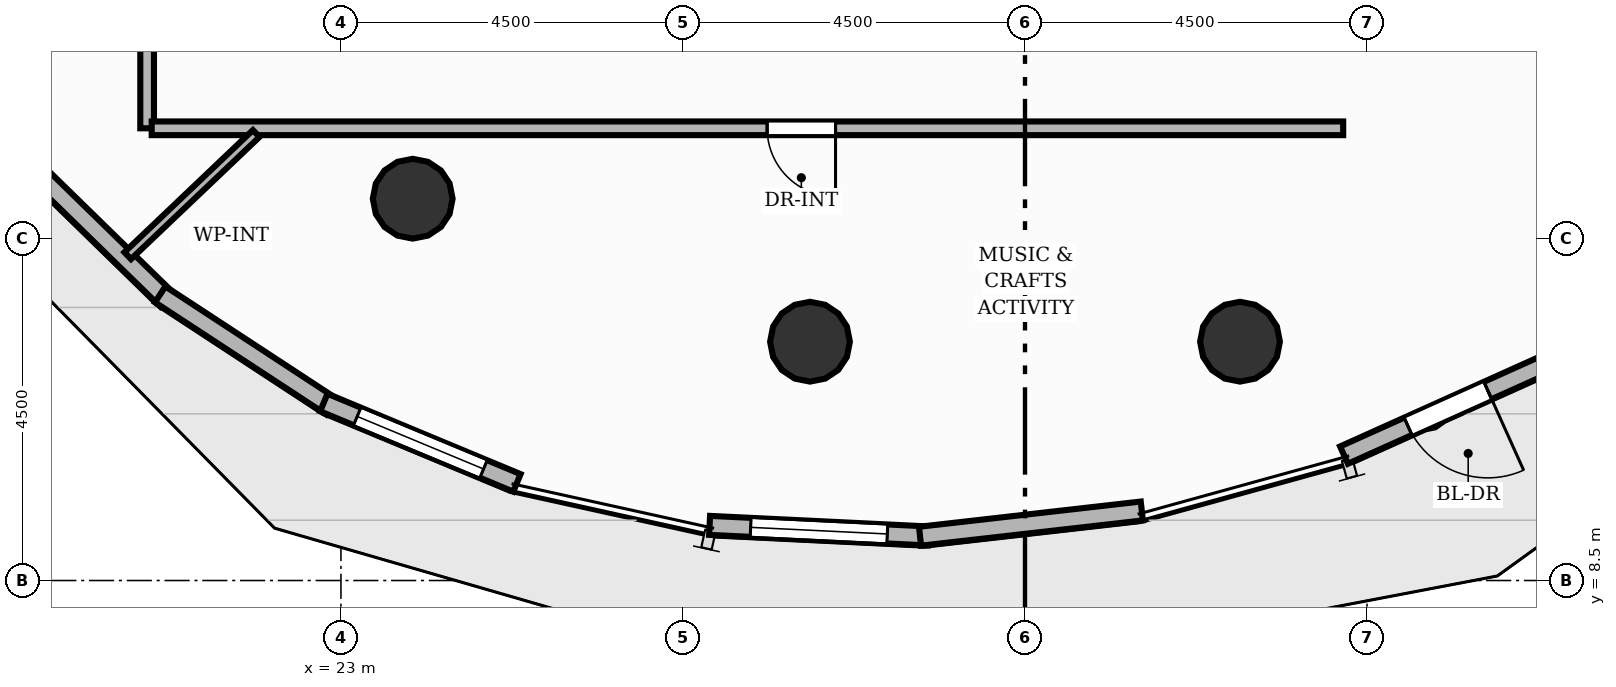
"""IFC4 building model, lengths in metres.
Left out: names, types, materials, properties, quantities, classifications, styles, units other than length and angle.
Written with IfcOpenShell. Run it as: python <this file> out.ifc"""

import sys

from ifc_helpers import new_model, si_unit, direction, frame, frame_2d, origin, origin_2d, place, context, subcontext, project, spatial, rectangle, circle, extrude, element, fill, save


model = new_model("IFC4")
c1 = context("Model", 3, precision=1e-05, world=origin(), true_north=direction((0.0, 1.0)))
c2 = subcontext(c1, "Body", "Model", "MODEL_VIEW")
j1 = project(units=[si_unit("LENGTHUNIT", "METRE"), si_unit("PLANEANGLEUNIT", "RADIAN")], contexts=[c1])
p1 = place(None, origin())
s1 = spatial("IfcSite", under=j1, at=p1, CompositionType="ELEMENT")
p2 = place(p1, origin())
s2 = spatial("IfcBuilding", under=s1, at=p2, CompositionType="ELEMENT")
p3 = place(p2, frame((0.0, 0.0, 116.96)))
s3 = spatial("IfcBuildingStorey", under=s2, at=p3, CompositionType="ELEMENT", Elevation=116.96)
for number, where, z_axis, x_axis in (
    (1, (23.944, 13.523, 0.0), (0.0, 0.0, 1.0), (1.0, 0.0, 0.0)),
    (2, (29.171, 11.642, 0.0), (0.0, 0.0, 1.0), (1.0, 0.0, 0.0)),
    (3, (34.829, 11.642, 0.0), (0.0, 0.0, 1.0), (1.0, 0.0, 0.0)),
):
    element("IfcColumn", number, at=place(p3, frame(where, z_axis=z_axis, x_axis=x_axis)), inside=s3, PredefinedType="COLUMN", context=c2, shape_type="SweptSolid", body=[
        extrude(circle(Radius=0.525, at=origin_2d()), origin(), (0.0, 0.0, 1.0), 3.2),
    ])
p4 = place(p3, frame((20.71, 12.194, 0.0), z_axis=(0.0, 0.0, 1.0), x_axis=(-0.715536902875, 0.698574935582, 0.0)))
e4 = element("IfcWall", 4, at=p4, inside=s3, PredefinedType="SOLIDWALL", context=c2, shape_type="SweptSolid", body=[
    extrude(rectangle(XDim=2.648, YDim=0.25, at=frame_2d((1.324, 0.0))), origin(), (0.0, 0.0, 1.0), 2.96),
])
p5 = place(p3, frame((22.874, 10.789, 0.0), z_axis=(0.0, 0.0, 1.0), x_axis=(-0.836445365251, 0.5480503179, 0.0)))
e5 = element("IfcWall", 5, at=p5, inside=s3, PredefinedType="SOLIDWALL", context=c2, shape_type="SweptSolid", body=[
    extrude(rectangle(XDim=2.693, YDim=0.25, at=frame_2d((1.346, 0.0))), origin(), (0.0, 0.0, 1.0), 2.96),
])
p6 = place(p3, frame((25.315, 9.784, 0.0), z_axis=(0.0, 0.0, 1.0), x_axis=(-0.923242191478, 0.384218500172, 0.0)))
e6 = element("IfcWall", 6, at=p6, inside=s3, PredefinedType="SOLIDWALL", context=c2, shape_type="SweptSolid", body=[
    extrude(rectangle(XDim=2.752, YDim=0.25, at=frame_2d((1.376, 0.0))), origin(), (0.0, 0.0, 1.0), 2.96),
])
p7 = place(p6, frame((0.476, 0.0, 0.85)))
e7 = element("IfcOpeningElement", 7, at=p7, cuts=e6, PredefinedType="OPENING", context=c2, shape_type="SweptSolid", body=[
    extrude(rectangle(XDim=1.8, YDim=2.0, at=frame_2d((0.9, 1.0))), frame((0.0, 0.135, 0.0), z_axis=(0.0, -1.0, 0.0), x_axis=(1.0, 0.0, 0.0)), (0.0, 0.0, 1.0), 0.27),
])
p8 = place(p3, frame((30.729, 9.086, 0.0), z_axis=(0.0, 0.0, 1.0), x_axis=(-0.998829284317, 0.048374174838, 0.0)))
e8 = element("IfcWall", 8, at=p8, inside=s3, PredefinedType="SOLIDWALL", context=c2, shape_type="SweptSolid", body=[
    extrude(rectangle(XDim=2.882, YDim=0.25, at=frame_2d((1.441, 0.0))), origin(), (0.0, 0.0, 1.0), 2.96),
])
p9 = place(p8, frame((0.541, 0.0, 0.85)))
e9 = element("IfcOpeningElement", 9, at=p9, cuts=e8, PredefinedType="OPENING", context=c2, shape_type="SweptSolid", body=[
    extrude(rectangle(XDim=1.8, YDim=1.45, at=frame_2d((0.9, 0.725))), frame((0.0, 0.135, 0.0), z_axis=(0.0, -1.0, 0.0), x_axis=(1.0, 0.0, 0.0)), (0.0, 0.0, 1.0), 0.27),
])
p10 = place(p3, frame((33.537, 9.415, 0.0), z_axis=(0.0, 0.0, 1.0), x_axis=(-0.993589349096, -0.113049570382, 0.0)))
e10 = element("IfcWall", 10, at=p10, inside=s3, PredefinedType="SOLIDWALL", context=c2, shape_type="SweptSolid", body=[
    extrude(rectangle(XDim=2.937, YDim=0.25, at=frame_2d((1.469, 0.0))), origin(), (0.0, 0.0, 1.0), 2.96),
])
p11 = place(p3, frame((38.931, 11.379, 0.0), z_axis=(0.0, 0.0, 1.0), x_axis=(-0.912043359661, -0.410093782076, 0.0)))
e11 = element("IfcWall", 11, at=p11, inside=s3, PredefinedType="SOLIDWALL", context=c2, shape_type="SweptSolid", body=[
    extrude(rectangle(XDim=2.998, YDim=0.25, at=frame_2d((1.499, 0.0))), origin(), (0.0, 0.0, 1.0), 2.96),
])
p12 = place(p11, frame((0.924, 0.0, 0.0)))
e12 = element("IfcOpeningElement", 12, at=p12, cuts=e11, PredefinedType="OPENING", context=c2, shape_type="SweptSolid", body=[
    extrude(rectangle(XDim=1.15, YDim=2.2, at=frame_2d((0.575, 1.1))), frame((0.0, 0.135, 0.0), z_axis=(0.0, -1.0, 0.0), x_axis=(1.0, 0.0, 0.0)), (0.0, 0.0, 1.0), 0.27),
])
p13 = place(p3, frame((20.45, 14.45, 0.0), z_axis=(0.0, 0.0, 1.0), x_axis=(0.0, 1.0, 0.0)))
e13 = element("IfcWall", 13, at=p13, inside=s3, PredefinedType="PARTITIONING", context=c2, shape_type="SweptSolid", body=[
    extrude(rectangle(XDim=18.507, YDim=0.18, at=frame_2d((9.254, 0.0))), origin(), (0.0, 0.0, 1.0), 2.955),
])
p14 = place(p13, frame((8.804, 0.0, 0.0)))
e14 = element("IfcOpeningElement", 14, at=p14, cuts=e13, PredefinedType="OPENING", context=c2, shape_type="SweptSolid", body=[
    extrude(rectangle(XDim=0.9, YDim=2.1, at=frame_2d((0.45, 1.05))), frame((0.0, 0.1, 0.0), z_axis=(0.0, -1.0, 0.0), x_axis=(1.0, 0.0, 0.0)), (0.0, 0.0, 1.0), 0.2),
])
p15 = place(p3, frame((36.186, 14.45, 0.0), z_axis=(0.0, 0.0, 1.0), x_axis=(-1.0, 0.0, 0.0)))
e15 = element("IfcWall", 15, at=p15, inside=s3, PredefinedType="PARTITIONING", context=c2, shape_type="SweptSolid", body=[
    extrude(rectangle(XDim=15.676, YDim=0.18, at=frame_2d((7.838, 0.0))), origin(), (0.0, 0.0, 1.0), 2.955),
])
p16 = place(p15, frame((6.679, 0.0, 0.0)))
e16 = element("IfcOpeningElement", 16, at=p16, cuts=e15, PredefinedType="OPENING", context=c2, shape_type="SweptSolid", body=[
    extrude(rectangle(XDim=0.9, YDim=2.1, at=frame_2d((0.45, 1.05))), frame((0.0, 0.1, 0.0), z_axis=(0.0, -1.0, 0.0), x_axis=(1.0, 0.0, 0.0)), (0.0, 0.0, 1.0), 0.2),
])
p17 = place(p3, frame((21.885, 14.381, 0.0), z_axis=(0.0, 0.0, 1.0), x_axis=(-0.724677896259, -0.68908776413, 0.0)))
e17 = element("IfcWall", 17, at=p17, inside=s3, PredefinedType="PARTITIONING", context=c2, shape_type="SweptSolid", body=[
    extrude(rectangle(XDim=2.332, YDim=0.125, at=frame_2d((1.166, 0.0))), origin(), (0.0, 0.0, 1.0), 2.955),
])
p18 = place(p12, origin())
e18 = element("IfcDoor", 18, at=p18, inside=s3, OperationType="SINGLE_SWING_LEFT", PredefinedType="DOOR", context=c2, shape_type="SweptSolid", body=[
    extrude(rectangle(XDim=1.15, YDim=2.2, at=frame_2d((0.575, 1.1))), frame((0.0, 0.025, 0.0), z_axis=(0.0, -1.0, 0.0), x_axis=(1.0, 0.0, 0.0)), (0.0, 0.0, 1.0), 0.05),
])
fill(e12, e18)
p19 = place(p7, origin())
e19 = element("IfcWindow", 19, at=p19, inside=s3, PartitioningType="SINGLE_PANEL", PredefinedType="WINDOW", context=c2, shape_type="SweptSolid", body=[
    extrude(rectangle(XDim=1.8, YDim=2.0, at=frame_2d((0.9, 1.0))), frame((0.0, 0.03, 0.0), z_axis=(0.0, -1.0, 0.0), x_axis=(1.0, 0.0, 0.0)), (0.0, 0.0, 1.0), 0.06),
])
fill(e7, e19)
p20 = place(p9, origin())
e20 = element("IfcWindow", 20, at=p20, inside=s3, PartitioningType="SINGLE_PANEL", PredefinedType="WINDOW", context=c2, shape_type="SweptSolid", body=[
    extrude(rectangle(XDim=1.8, YDim=1.45, at=frame_2d((0.9, 0.725))), frame((0.0, 0.03, 0.0), z_axis=(0.0, -1.0, 0.0), x_axis=(1.0, 0.0, 0.0)), (0.0, 0.0, 1.0), 0.06),
])
fill(e9, e20)
p21 = place(p16, origin())
e21 = element("IfcDoor", 21, at=p21, inside=s3, OperationType="SINGLE_SWING_LEFT", PredefinedType="DOOR", context=c2, shape_type="SweptSolid", body=[
    extrude(rectangle(XDim=0.9, YDim=2.1, at=frame_2d((0.45, 1.05))), frame((0.0, 0.025, 0.0), z_axis=(0.0, -1.0, 0.0), x_axis=(1.0, 0.0, 0.0)), (0.0, 0.0, 1.0), 0.05),
])
fill(e16, e21)
save(model, sys.argv[1])
